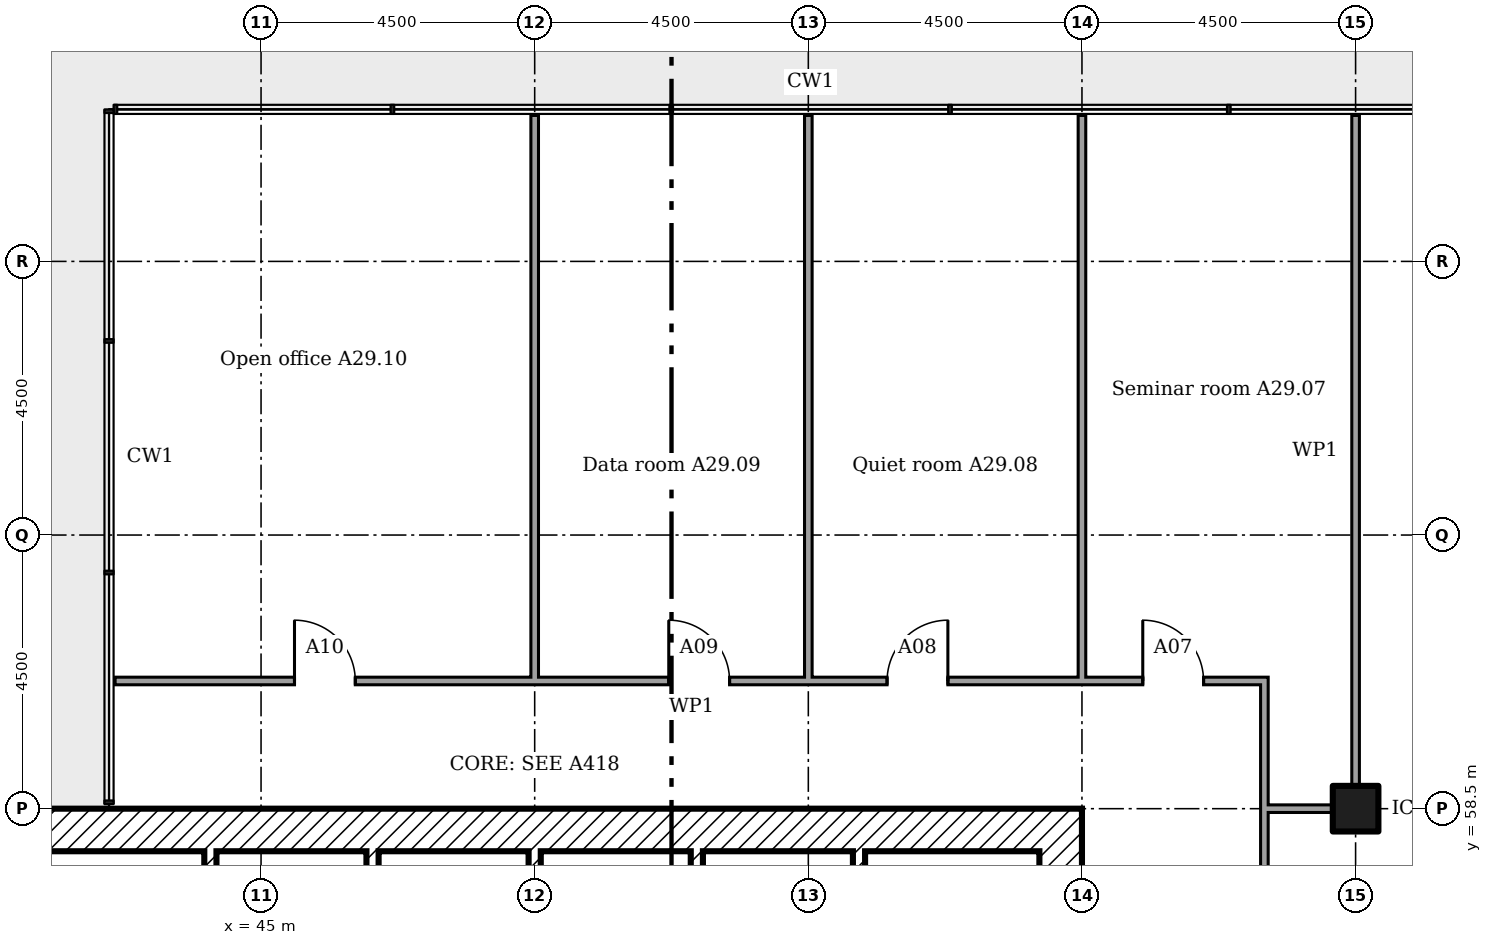
"""IFC4 building model, lengths in metres.
Left out: names, types, materials, properties, quantities, classifications, styles, units other than length and angle.
Written with IfcOpenShell. Run it as: python <this file> out.ifc"""

import sys

from ifc_helpers import new_model, si_unit, direction, frame, frame_2d, origin, origin_2d, place, context, subcontext, project, spatial, rectangle, extrude, element, fill, save


model = new_model("IFC4")
c1 = context("Model", 3, precision=1e-05, world=origin(), true_north=direction((0.0, 1.0)))
c2 = subcontext(c1, "Body", "Model", "MODEL_VIEW")
j1 = project(units=[si_unit("LENGTHUNIT", "METRE"), si_unit("PLANEANGLEUNIT", "RADIAN")], contexts=[c1])
p1 = place(None, origin())
s1 = spatial("IfcSite", under=j1, at=p1, CompositionType="ELEMENT")
p2 = place(p1, origin())
s2 = spatial("IfcBuilding", under=s1, at=p2, CompositionType="ELEMENT")
p3 = place(p2, frame((0.0, 0.0, 120.8)))
s3 = spatial("IfcBuildingStorey", under=s2, at=p3, CompositionType="ELEMENT", Elevation=120.8)
p4 = place(p3, frame((63.0, 58.5, 0.0)))
e1 = element("IfcColumn", 1, at=p4, inside=s3, PredefinedType="COLUMN", context=c2, shape_type="SweptSolid", body=[
    extrude(rectangle(XDim=0.75, YDim=0.75, at=origin_2d()), origin(), (0.0, 0.0, 1.0), 3.6),
])
p5 = place(p3, frame((58.15, 40.5, 0.0), z_axis=(0.0, 0.0, 1.0), x_axis=(0.0, 1.0, 0.0)))
e2 = element("IfcWall", 2, at=p5, inside=s3, PredefinedType="SHEAR", context=c2, shape_type="SweptSolid", body=[
    extrude(rectangle(XDim=18.0, YDim=0.7, at=frame_2d((9.0, 0.0))), origin(), (0.0, 0.0, 1.0), 3.35),
])
p6 = place(p5, frame((13.15, 0.0, 0.0)))
e3 = element("IfcOpeningElement", 3, at=p6, cuts=e2, PredefinedType="OPENING", context=c2, shape_type="SweptSolid", body=[
    extrude(rectangle(XDim=1.2, YDim=2.1, at=frame_2d((0.6, 1.05))), frame((0.0, 0.36, 0.0), z_axis=(0.0, -1.0, 0.0), x_axis=(1.0, 0.0, 0.0)), (0.0, 0.0, 1.0), 0.72),
])
p7 = place(p5, frame((3.9, 0.0, 0.0)))
e4 = element("IfcOpeningElement", 4, at=p7, cuts=e2, PredefinedType="OPENING", context=c2, shape_type="SweptSolid", body=[
    extrude(rectangle(XDim=1.8, YDim=2.1, at=frame_2d((0.9, 1.05))), frame((0.0, 0.36, 0.0), z_axis=(0.0, -1.0, 0.0), x_axis=(1.0, 0.0, 0.0)), (0.0, 0.0, 1.0), 0.72),
])
p8 = place(p5, frame((11.525, 0.0, 0.0)))
e5 = element("IfcOpeningElement", 5, at=p8, cuts=e2, PredefinedType="OPENING", context=c2, shape_type="SweptSolid", body=[
    extrude(rectangle(XDim=1.0, YDim=2.1, at=frame_2d((0.5, 1.05))), frame((0.0, 0.36, 0.0), z_axis=(0.0, -1.0, 0.0), x_axis=(1.0, 0.0, 0.0)), (0.0, 0.0, 1.0), 0.72),
])
p9 = place(p3, frame((41.2, 58.15, 0.0)))
e6 = element("IfcWall", 6, at=p9, inside=s3, PredefinedType="SHEAR", context=c2, shape_type="SweptSolid", body=[
    extrude(rectangle(XDim=16.6, YDim=0.7, at=frame_2d((8.3, 0.0))), origin(), (0.0, 0.0, 1.0), 3.35),
])
p10 = place(p3, frame((44.167, 57.8, 0.0), z_axis=(0.0, 0.0, 1.0), x_axis=(0.0, -1.0, 0.0)))
e7 = element("IfcWall", 7, at=p10, inside=s3, PredefinedType="SHEAR", context=c2, shape_type="SweptSolid", body=[
    extrude(rectangle(XDim=3.4, YDim=0.2, at=frame_2d((1.7, 0.0))), origin(), (0.0, 0.0, 1.0), 3.35),
])
p11 = place(p3, frame((46.833, 57.8, 0.0), z_axis=(0.0, 0.0, 1.0), x_axis=(0.0, -1.0, 0.0)))
e8 = element("IfcWall", 8, at=p11, inside=s3, PredefinedType="SHEAR", context=c2, shape_type="SweptSolid", body=[
    extrude(rectangle(XDim=4.5, YDim=0.2, at=frame_2d((2.25, 0.0))), origin(), (0.0, 0.0, 1.0), 3.35),
])
for number, where, z_axis, x_axis in (
    (9, (49.5, 57.8, 0.0), (0.0, 0.0, 1.0), (0.0, -1.0, 0.0)),
    (10, (52.167, 57.8, 0.0), (0.0, 0.0, 1.0), (0.0, -1.0, 0.0)),
    (11, (54.833, 57.8, 0.0), (0.0, 0.0, 1.0), (0.0, -1.0, 0.0)),
):
    element("IfcWall", number, at=place(p3, frame(where, z_axis=z_axis, x_axis=x_axis)), inside=s3, PredefinedType="SHEAR", context=c2, shape_type="SweptSolid", body=[
        extrude(rectangle(XDim=2.6, YDim=0.2, at=frame_2d((1.3, 0.0))), origin(), (0.0, 0.0, 1.0), 3.35),
    ])
p12 = place(p3, frame((61.5, 58.5, 0.0)))
e12 = element("IfcWall", 12, at=p12, inside=s3, PredefinedType="PARTITIONING", context=c2, shape_type="SweptSolid", body=[
    extrude(rectangle(XDim=1.125, YDim=0.125, at=frame_2d((0.562, 0.0))), origin(), (0.0, 0.0, 1.0), 2.676),
])
p13 = place(p3, frame((42.6, 60.6, 0.0)))
e13 = element("IfcWall", 13, at=p13, inside=s3, PredefinedType="PARTITIONING", context=c2, shape_type="SweptSolid", body=[
    extrude(rectangle(XDim=18.962, YDim=0.125, at=frame_2d((9.481, 0.0))), origin(), (0.0, 0.0, 1.0), 3.45),
])
p14 = place(p13, frame((16.9, 0.0, 0.0)))
e14 = element("IfcOpeningElement", 14, at=p14, cuts=e13, PredefinedType="OPENING", context=c2, shape_type="SweptSolid", body=[
    extrude(rectangle(XDim=1.0, YDim=2.1, at=frame_2d((0.5, 1.05))), frame((0.0, 0.073, 0.0), z_axis=(0.0, -1.0, 0.0), x_axis=(1.0, 0.0, 0.0)), (0.0, 0.0, 1.0), 0.145),
])
p15 = place(p13, frame((12.695, 0.0, 0.0)))
e15 = element("IfcOpeningElement", 15, at=p15, cuts=e13, PredefinedType="OPENING", context=c2, shape_type="SweptSolid", body=[
    extrude(rectangle(XDim=1.0, YDim=2.1, at=frame_2d((0.5, 1.05))), frame((0.0, 0.073, 0.0), z_axis=(0.0, -1.0, 0.0), x_axis=(1.0, 0.0, 0.0)), (0.0, 0.0, 1.0), 0.145),
])
p16 = place(p13, frame((9.105, 0.0, 0.0)))
e16 = element("IfcOpeningElement", 16, at=p16, cuts=e13, PredefinedType="OPENING", context=c2, shape_type="SweptSolid", body=[
    extrude(rectangle(XDim=1.0, YDim=2.1, at=frame_2d((0.5, 1.05))), frame((0.0, 0.073, 0.0), z_axis=(0.0, -1.0, 0.0), x_axis=(1.0, 0.0, 0.0)), (0.0, 0.0, 1.0), 0.145),
])
p17 = place(p13, frame((2.95, 0.0, 0.0)))
e17 = element("IfcOpeningElement", 17, at=p17, cuts=e13, PredefinedType="OPENING", context=c2, shape_type="SweptSolid", body=[
    extrude(rectangle(XDim=1.0, YDim=2.1, at=frame_2d((0.5, 1.05))), frame((0.0, 0.073, 0.0), z_axis=(0.0, -1.0, 0.0), x_axis=(1.0, 0.0, 0.0)), (0.0, 0.0, 1.0), 0.145),
])
for number, where, z_axis, x_axis in (
    (18, (49.5, 60.6, 0.0), (0.0, 0.0, 1.0), (0.0, 1.0, 0.0)),
    (19, (54.0, 60.6, 0.0), (0.0, 0.0, 1.0), (0.0, 1.0, 0.0)),
    (20, (58.5, 60.6, 0.0), (0.0, 0.0, 1.0), (0.0, 1.0, 0.0)),
):
    element("IfcWall", number, at=place(p3, frame(where, z_axis=z_axis, x_axis=x_axis)), inside=s3, PredefinedType="PARTITIONING", context=c2, shape_type="SweptSolid", body=[
        extrude(rectangle(XDim=9.3, YDim=0.125, at=frame_2d((4.65, 0.0))), origin(), (0.0, 0.0, 1.0), 2.766),
    ])
p18 = place(p3, frame((61.5, 50.762, 0.0), z_axis=(0.0, 0.0, 1.0), x_axis=(0.0, 1.0, 0.0)))
e21 = element("IfcWall", 21, at=p18, inside=s3, PredefinedType="PARTITIONING", context=c2, shape_type="SweptSolid", body=[
    extrude(rectangle(XDim=9.775, YDim=0.125, at=frame_2d((4.888, 0.0))), origin(), (0.0, 0.0, 1.0), 3.45),
])
p19 = place(p18, frame((3.83, 0.0, 0.0)))
e22 = element("IfcOpeningElement", 22, at=p19, cuts=e21, PredefinedType="OPENING", context=c2, shape_type="SweptSolid", body=[
    extrude(rectangle(XDim=1.8, YDim=2.1, at=frame_2d((0.9, 1.05))), frame((0.0, 0.073, 0.0), z_axis=(0.0, -1.0, 0.0), x_axis=(1.0, 0.0, 0.0)), (0.0, 0.0, 1.0), 0.145),
])
p20 = place(p3, frame((63.0, 58.875, 0.0), z_axis=(0.0, 0.0, 1.0), x_axis=(0.0, 1.0, 0.0)))
e23 = element("IfcWall", 23, at=p20, inside=s3, PredefinedType="PARTITIONING", context=c2, shape_type="SweptSolid", body=[
    extrude(rectangle(XDim=11.025, YDim=0.125, at=frame_2d((5.512, 0.0))), origin(), (0.0, 0.0, 1.0), 2.766),
])
p21 = place(p14, origin())
e24 = element("IfcDoor", 24, at=p21, inside=s3, OperationType="SINGLE_SWING_RIGHT", PredefinedType="DOOR", context=c2, shape_type="SweptSolid", body=[
    extrude(rectangle(XDim=1.0, YDim=2.1, at=frame_2d((0.5, 1.05))), frame((0.0, 0.025, 0.0), z_axis=(0.0, -1.0, 0.0), x_axis=(1.0, 0.0, 0.0)), (0.0, 0.0, 1.0), 0.05),
])
fill(e14, e24)
p22 = place(p15, origin())
e25 = element("IfcDoor", 25, at=p22, inside=s3, OperationType="SINGLE_SWING_LEFT", PredefinedType="DOOR", context=c2, shape_type="SweptSolid", body=[
    extrude(rectangle(XDim=1.0, YDim=2.1, at=frame_2d((0.5, 1.05))), frame((0.0, 0.025, 0.0), z_axis=(0.0, -1.0, 0.0), x_axis=(1.0, 0.0, 0.0)), (0.0, 0.0, 1.0), 0.05),
])
fill(e15, e25)
p23 = place(p16, origin())
e26 = element("IfcDoor", 26, at=p23, inside=s3, OperationType="SINGLE_SWING_RIGHT", PredefinedType="DOOR", context=c2, shape_type="SweptSolid", body=[
    extrude(rectangle(XDim=1.0, YDim=2.1, at=frame_2d((0.5, 1.05))), frame((0.0, 0.025, 0.0), z_axis=(0.0, -1.0, 0.0), x_axis=(1.0, 0.0, 0.0)), (0.0, 0.0, 1.0), 0.05),
])
fill(e16, e26)
p24 = place(p17, origin())
e27 = element("IfcDoor", 27, at=p24, inside=s3, OperationType="SINGLE_SWING_RIGHT", PredefinedType="DOOR", context=c2, shape_type="SweptSolid", body=[
    extrude(rectangle(XDim=1.0, YDim=2.1, at=frame_2d((0.5, 1.05))), frame((0.0, 0.025, 0.0), z_axis=(0.0, -1.0, 0.0), x_axis=(1.0, 0.0, 0.0)), (0.0, 0.0, 1.0), 0.05),
])
fill(e17, e27)
save(model, sys.argv[1])
